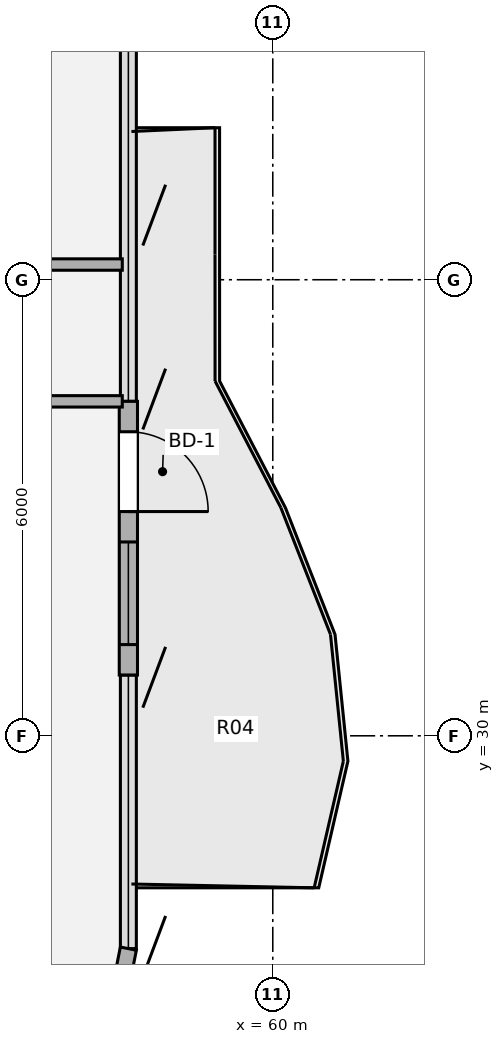
"""IFC4 building model, lengths in metres.
Left out: names, types, materials, properties, quantities, classifications, styles, units other than length and angle.
Written with IfcOpenShell. Run it as: python <this file> out.ifc"""

import sys

from ifc_helpers import new_model, si_unit, direction, frame, frame_2d, origin, origin_2d, place, context, subcontext, project, spatial, rectangle, extrude, source, transform, mapped, element, fill, save


model = new_model("IFC4")
c1 = context("Model", 3, precision=1e-05, world=origin(), true_north=direction((0.0, 1.0)))
c2 = subcontext(c1, "Body", "Model", "MODEL_VIEW")
j1 = project(units=[si_unit("LENGTHUNIT", "METRE"), si_unit("PLANEANGLEUNIT", "RADIAN")], contexts=[c1])
p1 = place(None, origin())
s1 = spatial("IfcSite", under=j1, at=p1, CompositionType="ELEMENT")
p2 = place(p1, origin())
s2 = spatial("IfcBuilding", under=s1, at=p2, CompositionType="ELEMENT")
p3 = place(p2, frame((0.0, 0.0, 123.84)))
s3 = spatial("IfcBuildingStorey", under=s2, at=p3, CompositionType="ELEMENT", Elevation=123.84)
p4 = place(p3, frame((58.1, 34.4, 0.0), z_axis=(0.0, 0.0, 1.0), x_axis=(0.0, -1.0, 0.0)))
e1 = element("IfcWall", 1, at=p4, inside=s3, PredefinedType="SOLIDWALL", context=c2, shape_type="SweptSolid", body=[
    extrude(rectangle(XDim=3.6, YDim=0.24, at=frame_2d((1.8, 0.0))), origin(), (0.0, 0.0, 1.0), 3.53),
])
p5 = place(p4, frame((0.4, 0.0, 0.0)))
e2 = element("IfcOpeningElement", 2, at=p5, cuts=e1, PredefinedType="OPENING", context=c2, shape_type="SweptSolid", body=[
    extrude(rectangle(XDim=1.05, YDim=2.15, at=origin_2d()), frame((0.525, 0.13, 1.075), z_axis=(0.0, -1.0, 0.0), x_axis=(1.0, 0.0, 0.0)), (0.0, 0.0, 1.0), 0.26),
])
p6 = place(p4, frame((1.85, 0.0, 0.85)))
e3 = element("IfcOpeningElement", 3, at=p6, cuts=e1, PredefinedType="OPENING", context=c2, shape_type="SweptSolid", body=[
    extrude(rectangle(XDim=1.35, YDim=1.35, at=origin_2d()), frame((0.675, 0.13, 0.675), z_axis=(0.0, -1.0, 0.0), x_axis=(1.0, 0.0, 0.0)), (0.0, 0.0, 1.0), 0.26),
])
p7 = place(p3, frame((58.1, 27.2, 0.0), z_axis=(0.0, 0.0, 1.0), x_axis=(-0.195138390419, -0.980775717779, 0.0)))
e4 = element("IfcWall", 4, at=p7, inside=s3, PredefinedType="SOLIDWALL", context=c2, shape_type="SweptSolid", body=[
    extrude(rectangle(XDim=1.249, YDim=0.215, at=frame_2d((0.624, 0.0))), origin(), (0.0, 0.0, 1.0), 3.53),
])
p8 = place(p3, frame((49.6, 34.4, 0.0), z_axis=(0.0, 0.0, 1.0), x_axis=(1.0, 0.0, 0.0)))
e5 = element("IfcWall", 5, at=p8, inside=s3, PredefinedType="PARTITIONING", context=c2, shape_type="SweptSolid", body=[
    extrude(rectangle(XDim=8.42, YDim=0.15, at=frame_2d((4.21, 0.0))), origin(), (0.0, 0.0, 1.0), 2.982),
])
p9 = place(p8, frame((1.375, 0.0, 0.0)))
e6 = element("IfcOpeningElement", 6, at=p9, cuts=e5, PredefinedType="OPENING", context=c2, shape_type="SweptSolid", body=[
    extrude(rectangle(XDim=1.05, YDim=2.1, at=origin_2d()), frame((0.525, 0.085, 1.05), z_axis=(0.0, -1.0, 0.0), x_axis=(1.0, 0.0, 0.0)), (0.0, 0.0, 1.0), 0.17),
])
p10 = place(p3, frame((49.6, 36.2, 0.0), z_axis=(0.0, 0.0, 1.0), x_axis=(1.0, 0.0, 0.0)))
e7 = element("IfcWall", 7, at=p10, inside=s3, PredefinedType="PARTITIONING", context=c2, shape_type="SweptSolid", body=[
    extrude(rectangle(XDim=8.42, YDim=0.15, at=frame_2d((4.21, 0.0))), origin(), (0.0, 0.0, 1.0), 2.982),
])
p11 = place(p10, frame((1.375, 0.0, 0.0)))
e8 = element("IfcOpeningElement", 8, at=p11, cuts=e7, PredefinedType="OPENING", context=c2, shape_type="SweptSolid", body=[
    extrude(rectangle(XDim=1.05, YDim=2.1, at=origin_2d()), frame((0.525, 0.085, 1.05), z_axis=(0.0, -1.0, 0.0), x_axis=(1.0, 0.0, 0.0)), (0.0, 0.0, 1.0), 0.17),
])
m1 = source(origin(), c2, "Body", "SweptSolid", [
    extrude(rectangle(XDim=1.05, YDim=2.15, at=origin_2d()), frame((0.525, 0.025, 1.075), z_axis=(0.0, -1.0, 0.0), x_axis=(1.0, 0.0, 0.0)), (0.0, 0.0, 1.0), 0.05),
])
p12 = place(p5, origin())
e9 = element("IfcDoor", 9, at=p12, inside=s3, OperationType="SINGLE_SWING_RIGHT", PredefinedType="DOOR", context=c2, shape_type="MappedRepresentation", body=[
    mapped(m1, transform((0.0, 0.0, 0.0), x_axis=(1.0, 0.0, 0.0), y_axis=(0.0, 1.0, 0.0), z_axis=(0.0, 0.0, 1.0), scale=1.0)),
])
fill(e2, e9)
m2 = source(origin(), c2, "Body", "SweptSolid", [
    extrude(rectangle(XDim=1.35, YDim=1.35, at=origin_2d()), frame((0.675, 0.03, 0.675), z_axis=(0.0, -1.0, 0.0), x_axis=(1.0, 0.0, 0.0)), (0.0, 0.0, 1.0), 0.06),
])
p13 = place(p6, origin())
e10 = element("IfcWindow", 10, at=p13, inside=s3, PartitioningType="SINGLE_PANEL", PredefinedType="WINDOW", context=c2, shape_type="MappedRepresentation", body=[
    mapped(m2, transform((0.0, 0.0, 0.0), x_axis=(1.0, 0.0, 0.0), y_axis=(0.0, 1.0, 0.0), z_axis=(0.0, 0.0, 1.0), scale=1.0)),
])
fill(e3, e10)
save(model, sys.argv[1])
